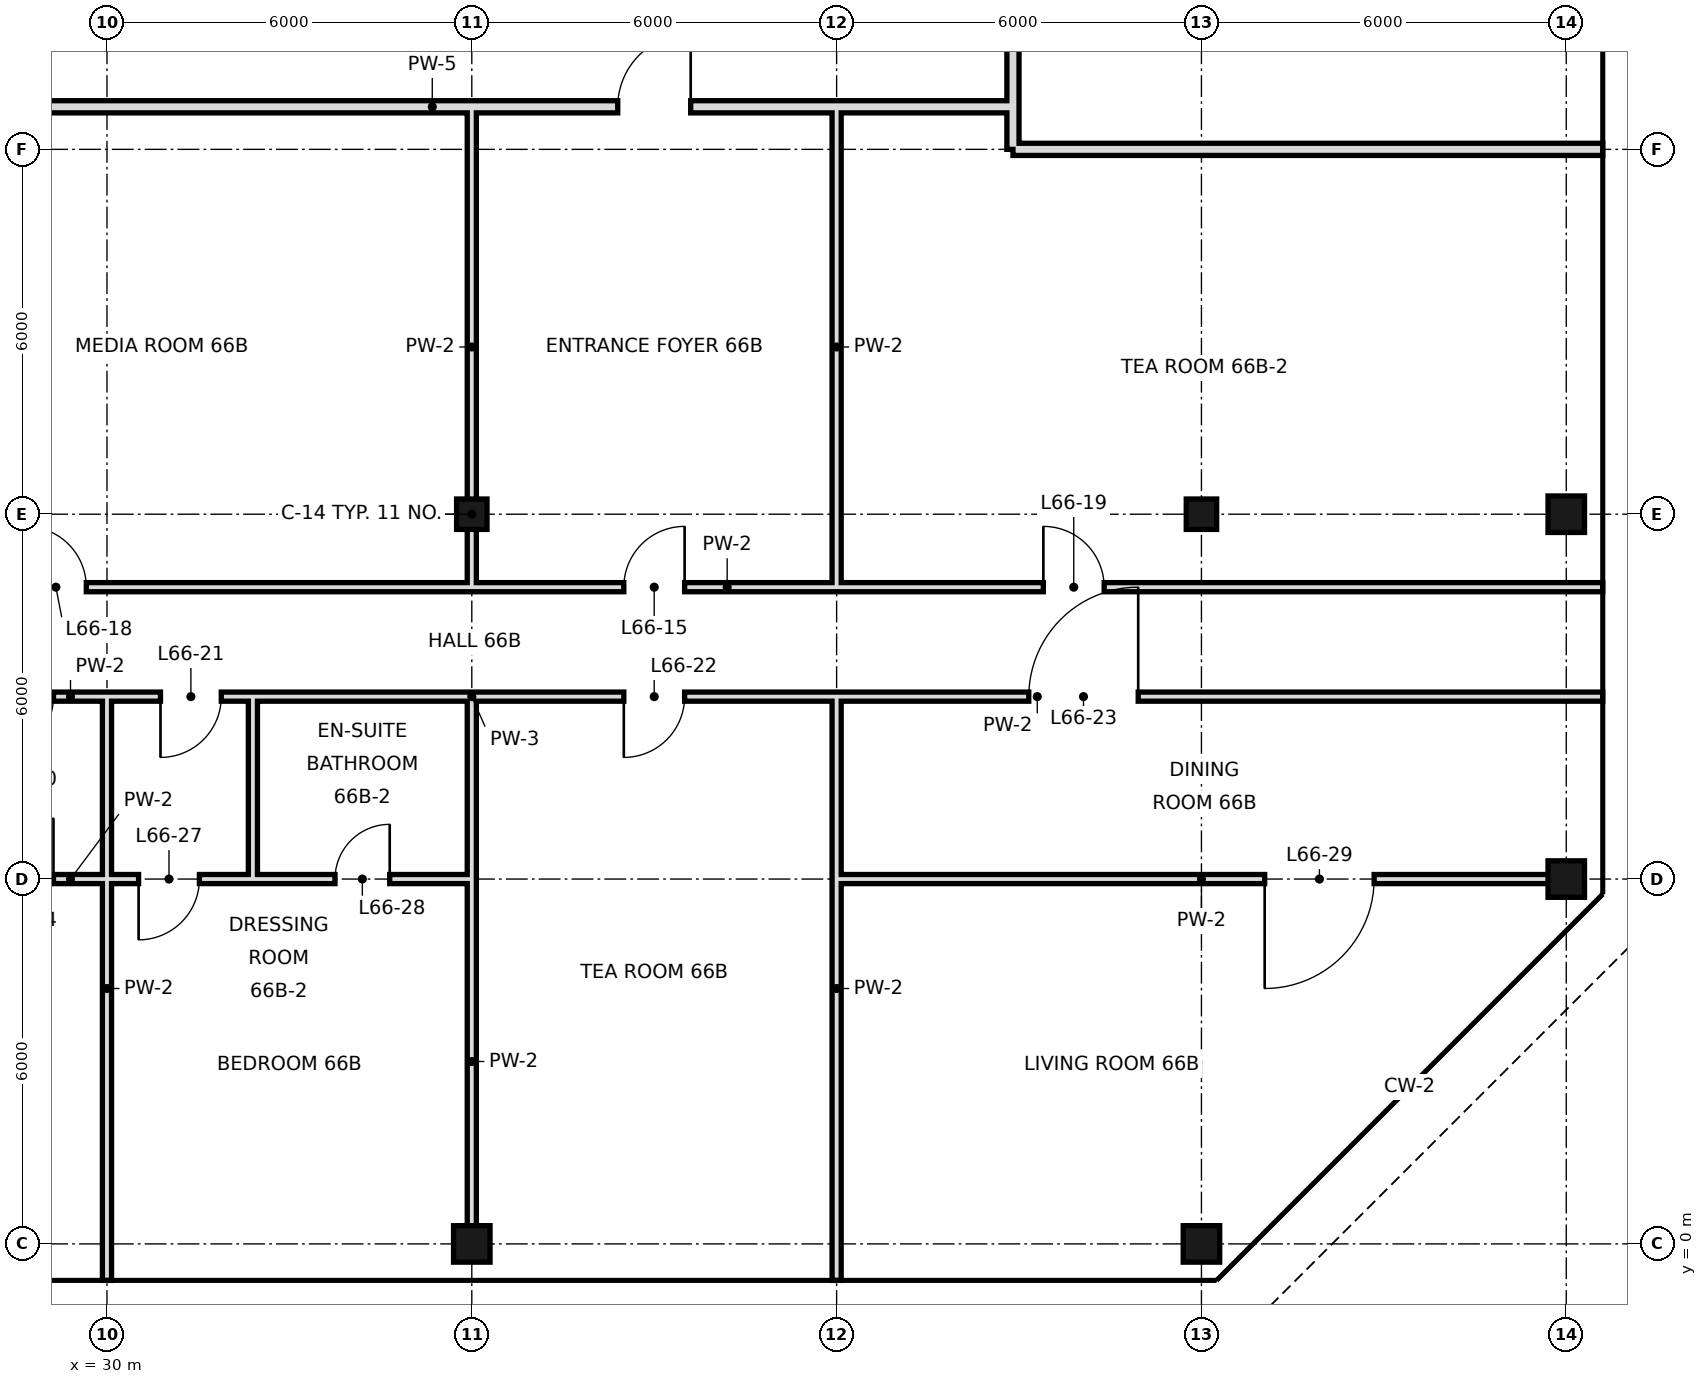
"""IFC4 building model, lengths in metres.
Left out: names, types, materials, properties, quantities, classifications, styles, units other than length and angle.
Written with IfcOpenShell. Run it as: python <this file> out.ifc"""

import sys

from ifc_helpers import new_model, si_unit, direction, frame, frame_2d, origin, origin_2d, place, context, subcontext, project, spatial, rectangle, hollow_rectangle, extrude, element, fill, save


model = new_model("IFC4")
c1 = context("Model", 3, precision=1e-05, world=origin(), true_north=direction((0.0, 1.0)))
c2 = subcontext(c1, "Body", "Model", "MODEL_VIEW")
j1 = project(units=[si_unit("LENGTHUNIT", "METRE"), si_unit("PLANEANGLEUNIT", "RADIAN")], contexts=[c1])
p1 = place(None, origin())
s1 = spatial("IfcSite", under=j1, at=p1, CompositionType="ELEMENT")
p2 = place(p1, origin())
s2 = spatial("IfcBuilding", under=s1, at=p2, CompositionType="ELEMENT")
p3 = place(p2, frame((0.0, 0.0, 277.4)))
s3 = spatial("IfcBuildingStorey", under=s2, at=p3, CompositionType="ELEMENT", Elevation=277.4)
p4 = place(p3, frame((36.0, 0.0, 0.0), z_axis=(0.0, 0.0, 1.0), x_axis=(1.0, 0.0, 0.0)))
e1 = element("IfcColumn", 1, at=p4, inside=s3, PredefinedType="COLUMN", context=c2, shape_type="SweptSolid", body=[
    extrude(hollow_rectangle(XDim=0.6, YDim=0.6, WallThickness=0.028, at=origin_2d()), origin(), (0.0, 0.0, 1.0), 4.4),
])
p5 = place(p3, frame((36.0, 12.0, 0.0), z_axis=(0.0, 0.0, 1.0), x_axis=(1.0, 0.0, 0.0)))
e2 = element("IfcColumn", 2, at=p5, inside=s3, PredefinedType="COLUMN", context=c2, shape_type="SweptSolid", body=[
    extrude(hollow_rectangle(XDim=0.5, YDim=0.5, WallThickness=0.025, at=origin_2d()), origin(), (0.0, 0.0, 1.0), 4.4),
])
p6 = place(p3, frame((48.0, 0.0, 0.0), z_axis=(0.0, 0.0, 1.0), x_axis=(1.0, 0.0, 0.0)))
e3 = element("IfcColumn", 3, at=p6, inside=s3, PredefinedType="COLUMN", context=c2, shape_type="SweptSolid", body=[
    extrude(hollow_rectangle(XDim=0.6, YDim=0.6, WallThickness=0.028, at=origin_2d()), origin(), (0.0, 0.0, 1.0), 4.4),
])
p7 = place(p3, frame((48.0, 12.0, 0.0), z_axis=(0.0, 0.0, 1.0), x_axis=(1.0, 0.0, 0.0)))
e4 = element("IfcColumn", 4, at=p7, inside=s3, PredefinedType="COLUMN", context=c2, shape_type="SweptSolid", body=[
    extrude(hollow_rectangle(XDim=0.5, YDim=0.5, WallThickness=0.025, at=origin_2d()), origin(), (0.0, 0.0, 1.0), 4.4),
])
for number, where, z_axis, x_axis in (
    (5, (54.0, 6.0, 0.0), (0.0, 0.0, 1.0), (1.0, 0.0, 0.0)),
    (6, (54.0, 12.0, 0.0), (0.0, 0.0, 1.0), (1.0, 0.0, 0.0)),
):
    element("IfcColumn", number, at=place(p3, frame(where, z_axis=z_axis, x_axis=x_axis)), inside=s3, PredefinedType="COLUMN", context=c2, shape_type="SweptSolid", body=[
        extrude(hollow_rectangle(XDim=0.6, YDim=0.6, WallThickness=0.028, at=origin_2d()), origin(), (0.0, 0.0, 1.0), 4.4),
    ])
p8 = place(p3, frame((30.0, -0.6, 0.0), z_axis=(0.0, 0.0, 1.0), x_axis=(0.0, 1.0, 0.0)))
e7 = element("IfcWall", 7, at=p8, inside=s3, PredefinedType="PARTITIONING", context=c2, shape_type="SweptSolid", body=[
    extrude(rectangle(XDim=9.6, YDim=0.15, at=frame_2d((4.8, 0.0))), origin(), (0.0, 0.0, 1.0), 3.4),
])
p9 = place(p3, frame((32.4, 6.0, 0.0), z_axis=(0.0, 0.0, 1.0), x_axis=(0.0, 1.0, 0.0)))
e8 = element("IfcWall", 8, at=p9, inside=s3, PredefinedType="PARTITIONING", context=c2, shape_type="SweptSolid", body=[
    extrude(rectangle(XDim=3.0, YDim=0.15, at=frame_2d((1.5, 0.0))), origin(), (0.0, 0.0, 1.0), 4.1),
])
p10 = place(p3, frame((36.0, 0.0, 0.0), z_axis=(0.0, 0.0, 1.0), x_axis=(0.0, 1.0, 0.0)))
e9 = element("IfcWall", 9, at=p10, inside=s3, PredefinedType="PARTITIONING", context=c2, shape_type="SweptSolid", body=[
    extrude(rectangle(XDim=6.0, YDim=0.15, at=frame_2d((3.0, 0.0))), origin(), (0.0, 0.0, 1.0), 3.4),
])
p11 = place(p3, frame((36.0, 10.8, 0.0), z_axis=(0.0, 0.0, 1.0), x_axis=(0.0, 1.0, 0.0)))
e10 = element("IfcWall", 10, at=p11, inside=s3, PredefinedType="PARTITIONING", context=c2, shape_type="SweptSolid", body=[
    extrude(rectangle(XDim=7.9, YDim=0.15, at=frame_2d((3.95, 0.0))), origin(), (0.0, 0.0, 1.0), 3.4),
])
p12 = place(p3, frame((36.0, 6.0, 0.0), z_axis=(0.0, 0.0, 1.0), x_axis=(0.0, 1.0, 0.0)))
e11 = element("IfcWall", 11, at=p12, inside=s3, PredefinedType="PARTITIONING", context=c2, shape_type="SweptSolid", body=[
    extrude(rectangle(XDim=3.0, YDim=0.15, at=frame_2d((1.5, 0.0))), origin(), (0.0, 0.0, 1.0), 3.4),
])
p13 = place(p3, frame((42.0, -0.6, 0.0), z_axis=(0.0, 0.0, 1.0), x_axis=(0.0, 1.0, 0.0)))
e12 = element("IfcWall", 12, at=p13, inside=s3, PredefinedType="PARTITIONING", context=c2, shape_type="SweptSolid", body=[
    extrude(rectangle(XDim=9.6, YDim=0.15, at=frame_2d((4.8, 0.0))), origin(), (0.0, 0.0, 1.0), 4.1),
])
p14 = place(p3, frame((42.0, 10.8, 0.0), z_axis=(0.0, 0.0, 1.0), x_axis=(0.0, 1.0, 0.0)))
e13 = element("IfcWall", 13, at=p14, inside=s3, PredefinedType="PARTITIONING", context=c2, shape_type="SweptSolid", body=[
    extrude(rectangle(XDim=7.9, YDim=0.15, at=frame_2d((3.95, 0.0))), origin(), (0.0, 0.0, 1.0), 3.4),
])
p15 = place(p3, frame((44.9, 18.0, 0.0), z_axis=(0.0, 0.0, 1.0), x_axis=(0.0, 1.0, 0.0)))
e14 = element("IfcWall", 14, at=p15, inside=s3, PredefinedType="SOLIDWALL", context=c2, shape_type="SweptSolid", body=[
    extrude(rectangle(XDim=30.6, YDim=0.2, at=frame_2d((15.3, 0.0))), origin(), (0.0, 0.0, 1.0), 3.65),
])
p16 = place(p15, frame((20.27, 0.0, 0.0)))
e15 = element("IfcOpeningElement", 15, at=p16, cuts=e14, PredefinedType="OPENING", context=c2, shape_type="SweptSolid", body=[
    extrude(rectangle(XDim=1.2, YDim=2.4, at=frame_2d((0.6, 1.2))), frame((0.0, 0.11, 0.0), z_axis=(0.0, -1.0, 0.0), x_axis=(1.0, 0.0, 0.0)), (0.0, 0.0, 1.0), 0.22),
])
p17 = place(p3, frame((25.8, 10.8, 0.0), z_axis=(0.0, 0.0, 1.0), x_axis=(1.0, 0.0, 0.0)))
e16 = element("IfcWall", 16, at=p17, inside=s3, PredefinedType="PARTITIONING", context=c2, shape_type="SweptSolid", body=[
    extrude(rectangle(XDim=28.8, YDim=0.15, at=frame_2d((14.4, 0.0))), origin(), (0.0, 0.0, 1.0), 4.1),
])
p18 = place(p17, frame((12.7, 0.0, 0.0)))
e17 = element("IfcOpeningElement", 17, at=p18, cuts=e16, PredefinedType="OPENING", context=c2, shape_type="SweptSolid", body=[
    extrude(rectangle(XDim=1.0, YDim=2.4, at=frame_2d((0.5, 1.2))), frame((0.0, 0.085, 0.0), z_axis=(0.0, -1.0, 0.0), x_axis=(1.0, 0.0, 0.0)), (0.0, 0.0, 1.0), 0.17),
])
p19 = place(p17, frame((2.86, 0.0, 0.0)))
e18 = element("IfcOpeningElement", 18, at=p19, cuts=e16, PredefinedType="OPENING", context=c2, shape_type="SweptSolid", body=[
    extrude(rectangle(XDim=1.0, YDim=2.4, at=frame_2d((0.5, 1.2))), frame((0.0, 0.085, 0.0), z_axis=(0.0, -1.0, 0.0), x_axis=(1.0, 0.0, 0.0)), (0.0, 0.0, 1.0), 0.17),
])
p20 = place(p17, frame((19.6, 0.0, 0.0)))
e19 = element("IfcOpeningElement", 19, at=p20, cuts=e16, PredefinedType="OPENING", context=c2, shape_type="SweptSolid", body=[
    extrude(rectangle(XDim=1.0, YDim=2.4, at=frame_2d((0.5, 1.2))), frame((0.0, 0.085, 0.0), z_axis=(0.0, -1.0, 0.0), x_axis=(1.0, 0.0, 0.0)), (0.0, 0.0, 1.0), 0.17),
])
p21 = place(p3, frame((44.9, 18.0, 0.0), z_axis=(0.0, 0.0, 1.0), x_axis=(1.0, 0.0, 0.0)))
e20 = element("IfcWall", 20, at=p21, inside=s3, PredefinedType="SOLIDWALL", context=c2, shape_type="SweptSolid", body=[
    extrude(rectangle(XDim=9.7, YDim=0.2, at=frame_2d((4.85, 0.0))), origin(), (0.0, 0.0, 1.0), 3.4),
])
p22 = place(p3, frame((25.8, 18.7, 0.0), z_axis=(0.0, 0.0, 1.0), x_axis=(1.0, 0.0, 0.0)))
e21 = element("IfcWall", 21, at=p22, inside=s3, PredefinedType="SOLIDWALL", context=c2, shape_type="SweptSolid", body=[
    extrude(rectangle(XDim=19.1, YDim=0.2, at=frame_2d((9.55, 0.0))), origin(), (0.0, 0.0, 1.0), 3.4),
])
p23 = place(p22, frame((12.6, 0.0, 0.0)))
e22 = element("IfcOpeningElement", 22, at=p23, cuts=e21, PredefinedType="OPENING", context=c2, shape_type="SweptSolid", body=[
    extrude(rectangle(XDim=1.2, YDim=2.4, at=frame_2d((0.6, 1.2))), frame((0.0, 0.11, 0.0), z_axis=(0.0, -1.0, 0.0), x_axis=(1.0, 0.0, 0.0)), (0.0, 0.0, 1.0), 0.22),
])
p24 = place(p3, frame((26.4, 6.0, 0.0), z_axis=(0.0, 0.0, 1.0), x_axis=(1.0, 0.0, 0.0)))
e23 = element("IfcWall", 23, at=p24, inside=s3, PredefinedType="PARTITIONING", context=c2, shape_type="SweptSolid", body=[
    extrude(rectangle(XDim=6.0, YDim=0.15, at=frame_2d((3.0, 0.0))), origin(), (0.0, 0.0, 1.0), 3.65),
])
p25 = place(p24, frame((1.72, 0.0, 0.0)))
e24 = element("IfcOpeningElement", 24, at=p25, cuts=e23, PredefinedType="OPENING", context=c2, shape_type="SweptSolid", body=[
    extrude(rectangle(XDim=1.0, YDim=2.4, at=frame_2d((0.5, 1.2))), frame((0.0, 0.085, 0.0), z_axis=(0.0, -1.0, 0.0), x_axis=(1.0, 0.0, 0.0)), (0.0, 0.0, 1.0), 0.17),
])
p26 = place(p24, frame((4.12, 0.0, 0.0)))
e25 = element("IfcOpeningElement", 25, at=p26, cuts=e23, PredefinedType="OPENING", context=c2, shape_type="SweptSolid", body=[
    extrude(rectangle(XDim=1.0, YDim=2.4, at=frame_2d((0.5, 1.2))), frame((0.0, 0.085, 0.0), z_axis=(0.0, -1.0, 0.0), x_axis=(1.0, 0.0, 0.0)), (0.0, 0.0, 1.0), 0.17),
])
p27 = place(p3, frame((42.0, 6.0, 0.0), z_axis=(0.0, 0.0, 1.0), x_axis=(1.0, 0.0, 0.0)))
e26 = element("IfcWall", 26, at=p27, inside=s3, PredefinedType="PARTITIONING", context=c2, shape_type="SweptSolid", body=[
    extrude(rectangle(XDim=12.0, YDim=0.15, at=frame_2d((6.0, 0.0))), origin(), (0.0, 0.0, 1.0), 3.4),
])
p28 = place(p27, frame((7.04, 0.0, 0.0)))
e27 = element("IfcOpeningElement", 27, at=p28, cuts=e26, PredefinedType="OPENING", context=c2, shape_type="SweptSolid", body=[
    extrude(rectangle(XDim=1.8, YDim=2.4, at=frame_2d((0.9, 1.2))), frame((0.0, 0.085, 0.0), z_axis=(0.0, -1.0, 0.0), x_axis=(1.0, 0.0, 0.0)), (0.0, 0.0, 1.0), 0.17),
])
p29 = place(p3, frame((32.4, 6.0, 0.0), z_axis=(0.0, 0.0, 1.0), x_axis=(1.0, 0.0, 0.0)))
e28 = element("IfcWall", 28, at=p29, inside=s3, PredefinedType="PARTITIONING", context=c2, shape_type="SweptSolid", body=[
    extrude(rectangle(XDim=3.6, YDim=0.15, at=frame_2d((1.8, 0.0))), origin(), (0.0, 0.0, 1.0), 3.65),
])
p30 = place(p29, frame((1.35, 0.0, 0.0)))
e29 = element("IfcOpeningElement", 29, at=p30, cuts=e28, PredefinedType="OPENING", context=c2, shape_type="SweptSolid", body=[
    extrude(rectangle(XDim=0.9, YDim=2.4, at=frame_2d((0.45, 1.2))), frame((0.0, 0.085, 0.0), z_axis=(0.0, -1.0, 0.0), x_axis=(1.0, 0.0, 0.0)), (0.0, 0.0, 1.0), 0.17),
])
p31 = place(p3, frame((26.4, 9.0, 0.0), z_axis=(0.0, 0.0, 1.0), x_axis=(1.0, 0.0, 0.0)))
e30 = element("IfcWall", 30, at=p31, inside=s3, PredefinedType="PARTITIONING", context=c2, shape_type="SweptSolid", body=[
    extrude(rectangle(XDim=6.0, YDim=0.15, at=frame_2d((3.0, 0.0))), origin(), (0.0, 0.0, 1.0), 4.1),
])
p32 = place(p31, frame((1.72, 0.0, 0.0)))
e31 = element("IfcOpeningElement", 31, at=p32, cuts=e30, PredefinedType="OPENING", context=c2, shape_type="SweptSolid", body=[
    extrude(rectangle(XDim=1.0, YDim=2.4, at=frame_2d((0.5, 1.2))), frame((0.0, 0.085, 0.0), z_axis=(0.0, -1.0, 0.0), x_axis=(1.0, 0.0, 0.0)), (0.0, 0.0, 1.0), 0.17),
])
p33 = place(p31, frame((4.48, 0.0, 0.0)))
e32 = element("IfcOpeningElement", 32, at=p33, cuts=e30, PredefinedType="OPENING", context=c2, shape_type="SweptSolid", body=[
    extrude(rectangle(XDim=1.0, YDim=2.4, at=frame_2d((0.5, 1.2))), frame((0.0, 0.085, 0.0), z_axis=(0.0, -1.0, 0.0), x_axis=(1.0, 0.0, 0.0)), (0.0, 0.0, 1.0), 0.17),
])
p34 = place(p3, frame((36.0, 9.0, 0.0), z_axis=(0.0, 0.0, 1.0), x_axis=(1.0, 0.0, 0.0)))
e33 = element("IfcWall", 33, at=p34, inside=s3, PredefinedType="PARTITIONING", context=c2, shape_type="SweptSolid", body=[
    extrude(rectangle(XDim=18.6, YDim=0.15, at=frame_2d((9.3, 0.0))), origin(), (0.0, 0.0, 1.0), 4.1),
])
p35 = place(p34, frame((2.5, 0.0, 0.0)))
e34 = element("IfcOpeningElement", 34, at=p35, cuts=e33, PredefinedType="OPENING", context=c2, shape_type="SweptSolid", body=[
    extrude(rectangle(XDim=1.0, YDim=2.4, at=frame_2d((0.5, 1.2))), frame((0.0, 0.085, 0.0), z_axis=(0.0, -1.0, 0.0), x_axis=(1.0, 0.0, 0.0)), (0.0, 0.0, 1.0), 0.17),
])
p36 = place(p34, frame((9.16, 0.0, 0.0)))
e35 = element("IfcOpeningElement", 35, at=p36, cuts=e33, PredefinedType="OPENING", context=c2, shape_type="SweptSolid", body=[
    extrude(rectangle(XDim=1.8, YDim=2.4, at=frame_2d((0.9, 1.2))), frame((0.0, 0.085, 0.0), z_axis=(0.0, -1.0, 0.0), x_axis=(1.0, 0.0, 0.0)), (0.0, 0.0, 1.0), 0.17),
])
p37 = place(p3, frame((32.4, 9.0, 0.0), z_axis=(0.0, 0.0, 1.0), x_axis=(1.0, 0.0, 0.0)))
e36 = element("IfcWall", 36, at=p37, inside=s3, PredefinedType="PARTITIONING", context=c2, shape_type="SweptSolid", body=[
    extrude(rectangle(XDim=3.6, YDim=0.15, at=frame_2d((1.8, 0.0))), origin(), (0.0, 0.0, 1.0), 4.1),
])
p38 = place(p18, frame((1.0, 0.0, 0.0), z_axis=(0.0, 0.0, 1.0), x_axis=(-1.0, 0.0, 0.0)))
e37 = element("IfcDoor", 37, at=p38, inside=s3, OperationType="SINGLE_SWING_LEFT", PredefinedType="DOOR", context=c2, shape_type="SweptSolid", body=[
    extrude(rectangle(XDim=1.0, YDim=2.4, at=frame_2d((0.5, 1.2))), frame((0.0, 0.025, 0.0), z_axis=(0.0, -1.0, 0.0), x_axis=(1.0, 0.0, 0.0)), (0.0, 0.0, 1.0), 0.05),
])
fill(e17, e37)
p39 = place(p19, origin())
e38 = element("IfcDoor", 38, at=p39, inside=s3, OperationType="SINGLE_SWING_LEFT", PredefinedType="DOOR", context=c2, shape_type="SweptSolid", body=[
    extrude(rectangle(XDim=1.0, YDim=2.4, at=frame_2d((0.5, 1.2))), frame((0.0, 0.025, 0.0), z_axis=(0.0, -1.0, 0.0), x_axis=(1.0, 0.0, 0.0)), (0.0, 0.0, 1.0), 0.05),
])
fill(e18, e38)
p40 = place(p20, origin())
e39 = element("IfcDoor", 39, at=p40, inside=s3, OperationType="SINGLE_SWING_LEFT", PredefinedType="DOOR", context=c2, shape_type="SweptSolid", body=[
    extrude(rectangle(XDim=1.0, YDim=2.4, at=frame_2d((0.5, 1.2))), frame((0.0, 0.025, 0.0), z_axis=(0.0, -1.0, 0.0), x_axis=(1.0, 0.0, 0.0)), (0.0, 0.0, 1.0), 0.05),
])
fill(e19, e39)
p41 = place(p32, frame((1.0, 0.0, 0.0), z_axis=(0.0, 0.0, 1.0), x_axis=(-1.0, 0.0, 0.0)))
e40 = element("IfcDoor", 40, at=p41, inside=s3, OperationType="SINGLE_SWING_RIGHT", PredefinedType="DOOR", context=c2, shape_type="SweptSolid", body=[
    extrude(rectangle(XDim=1.0, YDim=2.4, at=frame_2d((0.5, 1.2))), frame((0.0, 0.025, 0.0), z_axis=(0.0, -1.0, 0.0), x_axis=(1.0, 0.0, 0.0)), (0.0, 0.0, 1.0), 0.05),
])
fill(e31, e40)
p42 = place(p33, frame((1.0, 0.0, 0.0), z_axis=(0.0, 0.0, 1.0), x_axis=(-1.0, 0.0, 0.0)))
e41 = element("IfcDoor", 41, at=p42, inside=s3, OperationType="SINGLE_SWING_RIGHT", PredefinedType="DOOR", context=c2, shape_type="SweptSolid", body=[
    extrude(rectangle(XDim=1.0, YDim=2.4, at=frame_2d((0.5, 1.2))), frame((0.0, 0.025, 0.0), z_axis=(0.0, -1.0, 0.0), x_axis=(1.0, 0.0, 0.0)), (0.0, 0.0, 1.0), 0.05),
])
fill(e32, e41)
p43 = place(p35, frame((1.0, 0.0, 0.0), z_axis=(0.0, 0.0, 1.0), x_axis=(-1.0, 0.0, 0.0)))
e42 = element("IfcDoor", 42, at=p43, inside=s3, OperationType="SINGLE_SWING_RIGHT", PredefinedType="DOOR", context=c2, shape_type="SweptSolid", body=[
    extrude(rectangle(XDim=1.0, YDim=2.4, at=frame_2d((0.5, 1.2))), frame((0.0, 0.025, 0.0), z_axis=(0.0, -1.0, 0.0), x_axis=(1.0, 0.0, 0.0)), (0.0, 0.0, 1.0), 0.05),
])
fill(e34, e42)
p44 = place(p36, frame((1.8, 0.0, 0.0), z_axis=(0.0, 0.0, 1.0), x_axis=(-1.0, 0.0, 0.0)))
e43 = element("IfcDoor", 43, at=p44, inside=s3, OperationType="SINGLE_SWING_LEFT", PredefinedType="DOOR", context=c2, shape_type="SweptSolid", body=[
    extrude(rectangle(XDim=1.8, YDim=2.4, at=frame_2d((0.9, 1.2))), frame((0.0, 0.025, 0.0), z_axis=(0.0, -1.0, 0.0), x_axis=(1.0, 0.0, 0.0)), (0.0, 0.0, 1.0), 0.05),
])
fill(e35, e43)
p45 = place(p25, frame((1.0, 0.0, 0.0), z_axis=(0.0, 0.0, 1.0), x_axis=(-1.0, 0.0, 0.0)))
e44 = element("IfcDoor", 44, at=p45, inside=s3, OperationType="SINGLE_SWING_LEFT", PredefinedType="DOOR", context=c2, shape_type="SweptSolid", body=[
    extrude(rectangle(XDim=1.0, YDim=2.4, at=frame_2d((0.5, 1.2))), frame((0.0, 0.025, 0.0), z_axis=(0.0, -1.0, 0.0), x_axis=(1.0, 0.0, 0.0)), (0.0, 0.0, 1.0), 0.05),
])
fill(e24, e44)
p46 = place(p26, frame((1.0, 0.0, 0.0), z_axis=(0.0, 0.0, 1.0), x_axis=(-1.0, 0.0, 0.0)))
e45 = element("IfcDoor", 45, at=p46, inside=s3, OperationType="SINGLE_SWING_RIGHT", PredefinedType="DOOR", context=c2, shape_type="SweptSolid", body=[
    extrude(rectangle(XDim=1.0, YDim=2.4, at=frame_2d((0.5, 1.2))), frame((0.0, 0.025, 0.0), z_axis=(0.0, -1.0, 0.0), x_axis=(1.0, 0.0, 0.0)), (0.0, 0.0, 1.0), 0.05),
])
fill(e25, e45)
p47 = place(p30, frame((0.9, 0.0, 0.0), z_axis=(0.0, 0.0, 1.0), x_axis=(-1.0, 0.0, 0.0)))
e46 = element("IfcDoor", 46, at=p47, inside=s3, OperationType="SINGLE_SWING_LEFT", PredefinedType="DOOR", context=c2, shape_type="SweptSolid", body=[
    extrude(rectangle(XDim=0.9, YDim=2.4, at=frame_2d((0.45, 1.2))), frame((0.0, 0.025, 0.0), z_axis=(0.0, -1.0, 0.0), x_axis=(1.0, 0.0, 0.0)), (0.0, 0.0, 1.0), 0.05),
])
fill(e29, e46)
p48 = place(p28, frame((1.8, 0.0, 0.0), z_axis=(0.0, 0.0, 1.0), x_axis=(-1.0, 0.0, 0.0)))
e47 = element("IfcDoor", 47, at=p48, inside=s3, OperationType="SINGLE_SWING_RIGHT", PredefinedType="DOOR", context=c2, shape_type="SweptSolid", body=[
    extrude(rectangle(XDim=1.8, YDim=2.4, at=frame_2d((0.9, 1.2))), frame((0.0, 0.025, 0.0), z_axis=(0.0, -1.0, 0.0), x_axis=(1.0, 0.0, 0.0)), (0.0, 0.0, 1.0), 0.05),
])
fill(e27, e47)
p49 = place(p23, frame((1.2, 0.0, 0.0), z_axis=(0.0, 0.0, 1.0), x_axis=(-1.0, 0.0, 0.0)))
e48 = element("IfcDoor", 48, at=p49, inside=s3, OperationType="SINGLE_SWING_LEFT", PredefinedType="DOOR", context=c2, shape_type="SweptSolid", body=[
    extrude(rectangle(XDim=1.2, YDim=2.4, at=frame_2d((0.6, 1.2))), frame((0.0, 0.025, 0.0), z_axis=(0.0, -1.0, 0.0), x_axis=(1.0, 0.0, 0.0)), (0.0, 0.0, 1.0), 0.05),
])
fill(e22, e48)
save(model, sys.argv[1])
